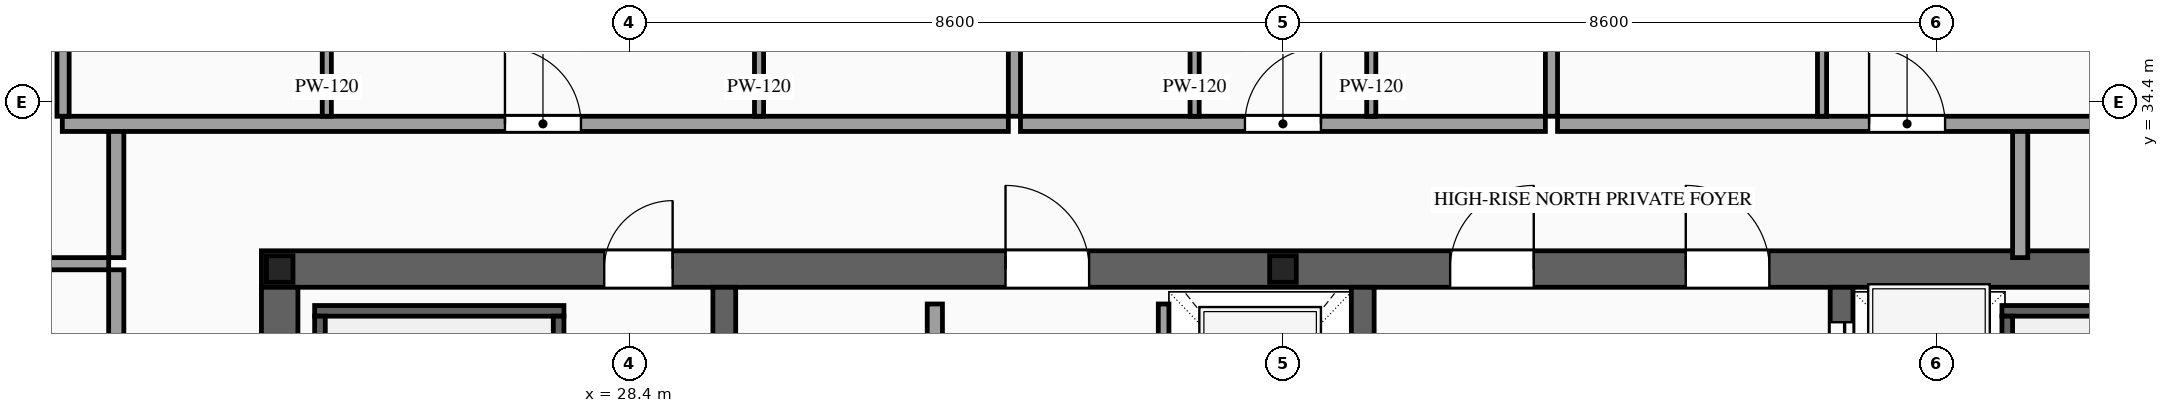
"""IFC4 building model, lengths in metres.
Left out: names, types, materials, properties, quantities, classifications, styles, units other than length and angle.
Written with IfcOpenShell. Run it as: python <this file> out.ifc"""

import sys

from ifc_helpers import new_model, si_unit, direction, frame, frame_2d, origin, origin_2d, place, context, subcontext, project, spatial, rectangle, i_section, extrude, source, transform, mapped, element, fill, save


model = new_model("IFC4")
c1 = context("Model", 3, precision=1e-05, world=origin(), true_north=direction((0.0, 1.0)))
c2 = subcontext(c1, "Body", "Model", "MODEL_VIEW")
j1 = project(units=[si_unit("LENGTHUNIT", "METRE"), si_unit("PLANEANGLEUNIT", "RADIAN")], contexts=[c1])
p1 = place(None, origin())
s1 = spatial("IfcSite", under=j1, at=p1, CompositionType="ELEMENT")
p2 = place(p1, origin())
s2 = spatial("IfcBuilding", under=s1, at=p2, CompositionType="ELEMENT")
p3 = place(p2, frame((0.0, 0.0, 339.2)))
s3 = spatial("IfcBuildingStorey", under=s2, at=p3, CompositionType="ELEMENT", Elevation=339.2)
p4 = place(p3, frame((23.56, 32.2, 0.0), z_axis=(0.0, 0.0, 1.0), x_axis=(1.0, 0.0, 0.0)))
e1 = element("IfcWall", 1, at=p4, inside=s3, PredefinedType="SHEAR", context=c2, shape_type="SweptSolid", body=[
    extrude(rectangle(XDim=26.88, YDim=0.48, at=frame_2d((13.44, 0.0))), origin(), (0.0, 0.0, 1.0), 4.0),
])
p5 = place(p4, frame((4.51, 0.0, 0.0)))
e2 = element("IfcOpeningElement", 2, at=p5, cuts=e1, PredefinedType="OPENING", context=c2, shape_type="SweptSolid", body=[
    extrude(rectangle(XDim=0.9, YDim=2.15, at=frame_2d((0.45, 1.075))), frame((0.0, 0.255, 0.0), z_axis=(0.0, -1.0, 0.0), x_axis=(1.0, 0.0, 0.0)), (0.0, 0.0, 1.0), 0.51),
])
p6 = place(p4, frame((9.79, 0.0, 0.0)))
e3 = element("IfcOpeningElement", 3, at=p6, cuts=e1, PredefinedType="OPENING", context=c2, shape_type="SweptSolid", body=[
    extrude(rectangle(XDim=1.1, YDim=2.2, at=frame_2d((0.55, 1.1))), frame((0.0, 0.255, 0.0), z_axis=(0.0, -1.0, 0.0), x_axis=(1.0, 0.0, 0.0)), (0.0, 0.0, 1.0), 0.51),
])
p7 = place(p4, frame((15.64, 0.0, 0.0)))
e4 = element("IfcOpeningElement", 4, at=p7, cuts=e1, PredefinedType="OPENING", context=c2, shape_type="SweptSolid", body=[
    extrude(rectangle(XDim=1.1, YDim=2.2, at=frame_2d((0.55, 1.1))), frame((0.0, 0.255, 0.0), z_axis=(0.0, -1.0, 0.0), x_axis=(1.0, 0.0, 0.0)), (0.0, 0.0, 1.0), 0.51),
])
p8 = place(p4, frame((18.74, 0.0, 0.0)))
e5 = element("IfcOpeningElement", 5, at=p8, cuts=e1, PredefinedType="OPENING", context=c2, shape_type="SweptSolid", body=[
    extrude(rectangle(XDim=1.1, YDim=2.2, at=frame_2d((0.55, 1.1))), frame((0.0, 0.255, 0.0), z_axis=(0.0, -1.0, 0.0), x_axis=(1.0, 0.0, 0.0)), (0.0, 0.0, 1.0), 0.51),
])
m1 = source(origin(), c2, "Body", "SweptSolid", [
    extrude(rectangle(XDim=12.32, YDim=0.48, at=frame_2d((6.16, 0.0))), origin(), (0.0, 0.0, 1.0), 4.0),
])
p9 = place(p3, frame((23.8, 19.64, 0.0), z_axis=(0.0, 0.0, 1.0), x_axis=(0.0, 1.0, 0.0)))
e6 = element("IfcWall", 6, at=p9, inside=s3, PredefinedType="SHEAR", context=c2, shape_type="MappedRepresentation", body=[
    mapped(m1, transform((0.0, 0.0, 0.0), scale=1.0)),
])
m2 = source(origin(), c2, "Body", "SweptSolid", [
    extrude(rectangle(XDim=12.32, YDim=0.3, at=frame_2d((6.16, 0.0))), origin(), (0.0, 0.0, 1.0), 4.0),
])
for number, where, z_axis, x_axis in (
    (7, (29.65, 19.64, 0.0), (0.0, 0.0, 1.0), (0.0, 1.0, 0.0)),
    (8, (38.05, 19.64, 0.0), (0.0, 0.0, 1.0), (0.0, 1.0, 0.0)),
):
    element("IfcWall", number, at=place(p3, frame(where, z_axis=z_axis, x_axis=x_axis)), inside=s3, PredefinedType="SOLIDWALL", context=c2, shape_type="MappedRepresentation", body=[
        mapped(m2, transform((0.0, 0.0, 0.0), scale=1.0)),
    ])
p10 = place(p3, frame((44.35, 19.64, 0.0), z_axis=(0.0, 0.0, 1.0), x_axis=(0.0, 1.0, 0.0)))
e9 = element("IfcWall", 9, at=p10, inside=s3, PredefinedType="SOLIDWALL", context=c2, shape_type="SweptSolid", body=[
    extrude(rectangle(XDim=12.32, YDim=0.3, at=frame_2d((6.16, 0.0))), origin(), (0.0, 0.0, 1.0), 4.0),
])
p11 = place(p10, frame((6.56, 0.0, 0.0)))
e10 = element("IfcOpeningElement", 10, at=p11, cuts=e9, PredefinedType="OPENING", context=c2, shape_type="SweptSolid", body=[
    extrude(rectangle(XDim=1.1, YDim=2.2, at=frame_2d((0.55, 1.1))), frame((0.0, 0.165, 0.0), z_axis=(0.0, -1.0, 0.0), x_axis=(1.0, 0.0, 0.0)), (0.0, 0.0, 1.0), 0.33),
])
p12 = place(p10, frame((8.66, 0.0, 0.0)))
e11 = element("IfcOpeningElement", 11, at=p12, cuts=e9, PredefinedType="OPENING", context=c2, shape_type="SweptSolid", body=[
    extrude(rectangle(XDim=1.1, YDim=2.2, at=frame_2d((0.55, 1.1))), frame((0.0, 0.165, 0.0), z_axis=(0.0, -1.0, 0.0), x_axis=(1.0, 0.0, 0.0)), (0.0, 0.0, 1.0), 0.33),
])
p13 = place(p10, frame((10.76, 0.0, 0.0)))
e12 = element("IfcOpeningElement", 12, at=p13, cuts=e9, PredefinedType="OPENING", context=c2, shape_type="SweptSolid", body=[
    extrude(rectangle(XDim=1.1, YDim=2.2, at=frame_2d((0.55, 1.1))), frame((0.0, 0.165, 0.0), z_axis=(0.0, -1.0, 0.0), x_axis=(1.0, 0.0, 0.0)), (0.0, 0.0, 1.0), 0.33),
])
m3 = source(origin(), c2, "Body", "SweptSolid", [
    extrude(i_section(OverallWidth=0.35, OverallDepth=0.35, WebThickness=0.012, FlangeThickness=0.019, at=origin_2d()), origin(), (0.0, 0.0, 1.0), 4.0),
])
for number, where, z_axis, x_axis in (
    (13, (23.8, 32.2, 0.0), (0.0, 0.0, 1.0), (1.0, 0.0, 0.0)),
    (14, (37.0, 32.2, 0.0), (0.0, 0.0, 1.0), (1.0, 0.0, 0.0)),
):
    element("IfcColumn", number, at=place(p3, frame(where, z_axis=z_axis, x_axis=x_axis)), inside=s3, PredefinedType="COLUMN", context=c2, shape_type="MappedRepresentation", body=[
        mapped(m3, transform((0.0, 0.0, 0.0), scale=1.0)),
    ])
p14 = place(p3, frame((35.43, 29.4, 0.0), z_axis=(0.0, 0.0, 1.0), x_axis=(0.0, 1.0, 0.0)))
e15 = element("IfcWall", 15, at=p14, inside=s3, PredefinedType="SOLIDWALL", context=c2, shape_type="SweptSolid", body=[
    extrude(rectangle(XDim=2.34, YDim=0.14, at=frame_2d((1.17, 0.0))), origin(), (0.0, 0.0, 1.0), 3.76),
])
p15 = place(p14, frame((0.62, 0.0, 0.0)))
e16 = element("IfcOpeningElement", 16, at=p15, cuts=e15, PredefinedType="OPENING", context=c2, shape_type="SweptSolid", body=[
    extrude(rectangle(XDim=1.1, YDim=2.2, at=frame_2d((0.55, 1.1))), frame((0.0, 0.085, 0.0), z_axis=(0.0, -1.0, 0.0), x_axis=(1.0, 0.0, 0.0)), (0.0, 0.0, 1.0), 0.17),
])
m4 = source(origin(), c2, "Body", "SweptSolid", [
    extrude(rectangle(XDim=3.28, YDim=0.14, at=frame_2d((1.64, 0.0))), origin(), (0.0, 0.0, 1.0), 3.76),
])
p16 = place(p3, frame((24.26, 31.65, 0.0), z_axis=(0.0, 0.0, 1.0), x_axis=(1.0, 0.0, 0.0)))
e17 = element("IfcWall", 17, at=p16, inside=s3, PredefinedType="SOLIDWALL", context=c2, shape_type="MappedRepresentation", body=[
    mapped(m4, transform((0.0, 0.0, 0.0), scale=1.0)),
])
m5 = source(origin(), c2, "Body", "SweptSolid", [
    extrude(rectangle(XDim=8.94, YDim=0.14, at=frame_2d((4.47, 0.0))), origin(), (0.0, 0.0, 1.0), 3.76),
])
for number, where, z_axis, x_axis in (
    (18, (24.33, 22.64, 0.0), (0.0, 0.0, 1.0), (0.0, 1.0, 0.0)),
    (19, (27.47, 22.64, 0.0), (0.0, 0.0, 1.0), (0.0, 1.0, 0.0)),
):
    element("IfcWall", number, at=place(p3, frame(where, z_axis=z_axis, x_axis=x_axis)), inside=s3, PredefinedType="SOLIDWALL", context=c2, shape_type="MappedRepresentation", body=[
        mapped(m5, transform((0.0, 0.0, 0.0), scale=1.0)),
    ])
p17 = place(p3, frame((46.46, 31.65, 0.0), z_axis=(0.0, 0.0, 1.0), x_axis=(1.0, 0.0, 0.0)))
e20 = element("IfcWall", 20, at=p17, inside=s3, PredefinedType="SOLIDWALL", context=c2, shape_type="MappedRepresentation", body=[
    mapped(m4, transform((0.0, 0.0, 0.0), scale=1.0)),
])
p18 = place(p3, frame((46.53, 22.64, 0.0), z_axis=(0.0, 0.0, 1.0), x_axis=(0.0, 1.0, 0.0)))
e21 = element("IfcWall", 21, at=p18, inside=s3, PredefinedType="SOLIDWALL", context=c2, shape_type="MappedRepresentation", body=[
    mapped(m5, transform((0.0, 0.0, 0.0), scale=1.0)),
])
p19 = place(p3, frame((32.42, 25.92, 0.0), z_axis=(0.0, 0.0, 1.0), x_axis=(0.0, 1.0, 0.0)))
e22 = element("IfcWall", 22, at=p19, inside=s3, PredefinedType="PARTITIONING", context=c2, shape_type="SweptSolid", body=[
    extrude(rectangle(XDim=5.82, YDim=0.2, at=frame_2d((2.91, 0.0))), origin(), (0.0, 0.0, 1.0), 3.76),
])
p20 = place(p19, frame((2.46, 0.0, 0.0)))
e23 = element("IfcOpeningElement", 23, at=p20, cuts=e22, PredefinedType="OPENING", context=c2, shape_type="SweptSolid", body=[
    extrude(rectangle(XDim=0.9, YDim=2.15, at=frame_2d((0.45, 1.075))), frame((0.0, 0.115, 0.0), z_axis=(0.0, -1.0, 0.0), x_axis=(1.0, 0.0, 0.0)), (0.0, 0.0, 1.0), 0.23),
])
m6 = source(origin(), c2, "Body", "SweptSolid", [
    extrude(rectangle(XDim=1.7, YDim=0.2, at=frame_2d((0.85, 0.0))), origin(), (0.0, 0.0, 1.0), 3.76),
])
for number, where, z_axis, x_axis in (
    (24, (21.65, 32.35, 0.0), (0.0, 0.0, 1.0), (0.0, 1.0, 0.0)),
    (25, (46.7, 32.35, 0.0), (0.0, 0.0, 1.0), (0.0, 1.0, 0.0)),
):
    element("IfcWall", number, at=place(p3, frame(where, z_axis=z_axis, x_axis=x_axis)), inside=s3, PredefinedType="PARTITIONING", context=c2, shape_type="MappedRepresentation", body=[
        mapped(m6, transform((0.0, 0.0, 0.0), scale=1.0)),
    ])
p21 = place(p3, frame((20.94, 34.11, 0.0), z_axis=(0.0, 0.0, 1.0), x_axis=(1.0, 0.0, 0.0)))
e26 = element("IfcWall", 26, at=p21, inside=s3, PredefinedType="PARTITIONING", context=c2, shape_type="SweptSolid", body=[
    extrude(rectangle(XDim=12.447, YDim=0.2, at=frame_2d((6.224, 0.0))), origin(), (0.0, 0.0, 1.0), 3.76),
])
p22 = place(p21, frame((5.824, 0.0, 0.0)))
e27 = element("IfcOpeningElement", 27, at=p22, cuts=e26, PredefinedType="OPENING", context=c2, shape_type="SweptSolid", body=[
    extrude(rectangle(XDim=1.0, YDim=2.2, at=frame_2d((0.5, 1.1))), frame((0.0, 0.115, 0.0), z_axis=(0.0, -1.0, 0.0), x_axis=(1.0, 0.0, 0.0)), (0.0, 0.0, 1.0), 0.23),
])
m7 = source(origin(), c2, "Body", "SweptSolid", [
    extrude(rectangle(XDim=10.54, YDim=0.16, at=frame_2d((5.27, 0.0))), origin(), (0.0, 0.0, 1.0), 3.76),
])
p23 = place(p3, frame((33.467, 34.21, 0.0), z_axis=(0.0, 0.0, 1.0), x_axis=(0.0, 1.0, 0.0)))
e28 = element("IfcWall", 28, at=p23, inside=s3, PredefinedType="PARTITIONING", context=c2, shape_type="MappedRepresentation", body=[
    mapped(m7, transform((0.0, 0.0, 0.0), scale=1.0)),
])
p24 = place(p3, frame((24.42, 34.21, 0.0), z_axis=(0.0, 0.0, 1.0), x_axis=(0.0, 1.0, 0.0)))
e29 = element("IfcWall", 29, at=p24, inside=s3, PredefinedType="PARTITIONING", context=c2, shape_type="SweptSolid", body=[
    extrude(rectangle(XDim=2.9, YDim=0.12, at=frame_2d((1.45, 0.0))), origin(), (0.0, 0.0, 1.0), 3.76),
])
p25 = place(p24, frame((1.025, 0.0, 0.0)))
e30 = element("IfcOpeningElement", 30, at=p25, cuts=e29, PredefinedType="OPENING", context=c2, shape_type="SweptSolid", body=[
    extrude(rectangle(XDim=0.85, YDim=2.1, at=frame_2d((0.425, 1.05))), frame((0.0, 0.075, 0.0), z_axis=(0.0, -1.0, 0.0), x_axis=(1.0, 0.0, 0.0)), (0.0, 0.0, 1.0), 0.15),
])
p26 = place(p3, frame((30.107, 34.21, 0.0), z_axis=(0.0, 0.0, 1.0), x_axis=(0.0, 1.0, 0.0)))
e31 = element("IfcWall", 31, at=p26, inside=s3, PredefinedType="PARTITIONING", context=c2, shape_type="SweptSolid", body=[
    extrude(rectangle(XDim=2.9, YDim=0.12, at=frame_2d((1.45, 0.0))), origin(), (0.0, 0.0, 1.0), 3.76),
])
p27 = place(p26, frame((1.025, 0.0, 0.0)))
e32 = element("IfcOpeningElement", 32, at=p27, cuts=e31, PredefinedType="OPENING", context=c2, shape_type="SweptSolid", body=[
    extrude(rectangle(XDim=0.85, YDim=2.1, at=frame_2d((0.425, 1.05))), frame((0.0, 0.075, 0.0), z_axis=(0.0, -1.0, 0.0), x_axis=(1.0, 0.0, 0.0)), (0.0, 0.0, 1.0), 0.15),
])
p28 = place(p3, frame((33.547, 34.11, 0.0), z_axis=(0.0, 0.0, 1.0), x_axis=(1.0, 0.0, 0.0)))
e33 = element("IfcWall", 33, at=p28, inside=s3, PredefinedType="PARTITIONING", context=c2, shape_type="SweptSolid", body=[
    extrude(rectangle(XDim=6.906, YDim=0.2, at=frame_2d((3.453, 0.0))), origin(), (0.0, 0.0, 1.0), 3.76),
])
p29 = place(p28, frame((2.953, 0.0, 0.0)))
e34 = element("IfcOpeningElement", 34, at=p29, cuts=e33, PredefinedType="OPENING", context=c2, shape_type="SweptSolid", body=[
    extrude(rectangle(XDim=1.0, YDim=2.2, at=frame_2d((0.5, 1.1))), frame((0.0, 0.115, 0.0), z_axis=(0.0, -1.0, 0.0), x_axis=(1.0, 0.0, 0.0)), (0.0, 0.0, 1.0), 0.23),
])
p30 = place(p3, frame((40.533, 34.21, 0.0), z_axis=(0.0, 0.0, 1.0), x_axis=(0.0, 1.0, 0.0)))
e35 = element("IfcWall", 35, at=p30, inside=s3, PredefinedType="PARTITIONING", context=c2, shape_type="MappedRepresentation", body=[
    mapped(m7, transform((0.0, 0.0, 0.0), scale=1.0)),
])
p31 = place(p3, frame((35.838, 34.21, 0.0), z_axis=(0.0, 0.0, 1.0), x_axis=(0.0, 1.0, 0.0)))
e36 = element("IfcWall", 36, at=p31, inside=s3, PredefinedType="PARTITIONING", context=c2, shape_type="SweptSolid", body=[
    extrude(rectangle(XDim=2.9, YDim=0.12, at=frame_2d((1.45, 0.0))), origin(), (0.0, 0.0, 1.0), 3.76),
])
p32 = place(p31, frame((1.025, 0.0, 0.0)))
e37 = element("IfcOpeningElement", 37, at=p32, cuts=e36, PredefinedType="OPENING", context=c2, shape_type="SweptSolid", body=[
    extrude(rectangle(XDim=0.85, YDim=2.1, at=frame_2d((0.425, 1.05))), frame((0.0, 0.075, 0.0), z_axis=(0.0, -1.0, 0.0), x_axis=(1.0, 0.0, 0.0)), (0.0, 0.0, 1.0), 0.15),
])
p33 = place(p3, frame((38.162, 34.21, 0.0), z_axis=(0.0, 0.0, 1.0), x_axis=(0.0, 1.0, 0.0)))
e38 = element("IfcWall", 38, at=p33, inside=s3, PredefinedType="PARTITIONING", context=c2, shape_type="SweptSolid", body=[
    extrude(rectangle(XDim=2.9, YDim=0.12, at=frame_2d((1.45, 0.0))), origin(), (0.0, 0.0, 1.0), 3.76),
])
p34 = place(p33, frame((1.025, 0.0, 0.0)))
e39 = element("IfcOpeningElement", 39, at=p34, cuts=e38, PredefinedType="OPENING", context=c2, shape_type="SweptSolid", body=[
    extrude(rectangle(XDim=0.85, YDim=2.1, at=frame_2d((0.425, 1.05))), frame((0.0, 0.075, 0.0), z_axis=(0.0, -1.0, 0.0), x_axis=(1.0, 0.0, 0.0)), (0.0, 0.0, 1.0), 0.15),
])
p35 = place(p3, frame((40.613, 34.11, 0.0), z_axis=(0.0, 0.0, 1.0), x_axis=(1.0, 0.0, 0.0)))
e40 = element("IfcWall", 40, at=p35, inside=s3, PredefinedType="PARTITIONING", context=c2, shape_type="SweptSolid", body=[
    extrude(rectangle(XDim=12.447, YDim=0.2, at=frame_2d((6.224, 0.0))), origin(), (0.0, 0.0, 1.0), 3.76),
])
p36 = place(p35, frame((4.099, 0.0, 0.0)))
e41 = element("IfcOpeningElement", 41, at=p36, cuts=e40, PredefinedType="OPENING", context=c2, shape_type="SweptSolid", body=[
    extrude(rectangle(XDim=1.0, YDim=2.2, at=frame_2d((0.5, 1.1))), frame((0.0, 0.115, 0.0), z_axis=(0.0, -1.0, 0.0), x_axis=(1.0, 0.0, 0.0)), (0.0, 0.0, 1.0), 0.23),
])
m8 = source(origin(), c2, "Body", "SweptSolid", [
    extrude(rectangle(XDim=10.39, YDim=0.16, at=frame_2d((5.195, 0.0))), origin(), (0.0, 0.0, 1.0), 3.76),
])
p37 = place(p3, frame((20.95, 34.21, 0.0), z_axis=(0.0, 0.0, 1.0), x_axis=(0.0, 1.0, 0.0)))
e42 = element("IfcWall", 42, at=p37, inside=s3, PredefinedType="PARTITIONING", context=c2, shape_type="MappedRepresentation", body=[
    mapped(m8, transform((0.0, 0.0, 0.0), scale=1.0)),
])
p38 = place(p3, frame((44.093, 34.21, 0.0), z_axis=(0.0, 0.0, 1.0), x_axis=(0.0, 1.0, 0.0)))
e43 = element("IfcWall", 43, at=p38, inside=s3, PredefinedType="PARTITIONING", context=c2, shape_type="SweptSolid", body=[
    extrude(rectangle(XDim=2.9, YDim=0.12, at=frame_2d((1.45, 0.0))), origin(), (0.0, 0.0, 1.0), 3.76),
])
p39 = place(p38, frame((1.025, 0.0, 0.0)))
e44 = element("IfcOpeningElement", 44, at=p39, cuts=e43, PredefinedType="OPENING", context=c2, shape_type="SweptSolid", body=[
    extrude(rectangle(XDim=0.85, YDim=2.1, at=frame_2d((0.425, 1.05))), frame((0.0, 0.075, 0.0), z_axis=(0.0, -1.0, 0.0), x_axis=(1.0, 0.0, 0.0)), (0.0, 0.0, 1.0), 0.15),
])
p40 = place(p3, frame((21.65, 19.41, 0.0), z_axis=(0.0, 0.0, 1.0), x_axis=(0.0, 1.0, 0.0)))
e45 = element("IfcWall", 45, at=p40, inside=s3, PredefinedType="PARTITIONING", context=c2, shape_type="SweptSolid", body=[
    extrude(rectangle(XDim=12.78, YDim=0.2, at=frame_2d((6.39, 0.0))), origin(), (0.0, 0.0, 1.0), 3.76),
])
p41 = place(p40, frame((5.89, 0.0, 0.0)))
e46 = element("IfcOpeningElement", 46, at=p41, cuts=e45, PredefinedType="OPENING", context=c2, shape_type="SweptSolid", body=[
    extrude(rectangle(XDim=1.0, YDim=2.2, at=frame_2d((0.5, 1.1))), frame((0.0, 0.115, 0.0), z_axis=(0.0, -1.0, 0.0), x_axis=(1.0, 0.0, 0.0)), (0.0, 0.0, 1.0), 0.23),
])
m9 = source(origin(), c2, "Body", "SweptSolid", [
    extrude(rectangle(XDim=3.5, YDim=0.16, at=frame_2d((1.75, 0.0))), origin(), (0.0, 0.0, 1.0), 3.305),
])
p42 = place(p3, frame((18.05, 32.27, 0.0), z_axis=(0.0, 0.0, 1.0), x_axis=(1.0, 0.0, 0.0)))
e47 = element("IfcWall", 47, at=p42, inside=s3, PredefinedType="PARTITIONING", context=c2, shape_type="MappedRepresentation", body=[
    mapped(m9, transform((0.0, 0.0, 0.0), scale=1.0)),
])
m10 = source(origin(), c2, "Body", "SweptSolid", [
    extrude(rectangle(XDim=1.1, YDim=2.2, at=frame_2d((0.55, 1.1))), frame((0.0, 0.025, 0.0), z_axis=(0.0, -1.0, 0.0), x_axis=(1.0, 0.0, 0.0)), (0.0, 0.0, 1.0), 0.05),
])
p43 = place(p13, origin())
e48 = element("IfcDoor", 48, at=p43, inside=s3, OperationType="SLIDING_TO_LEFT", PredefinedType="DOOR", context=c2, shape_type="MappedRepresentation", body=[
    mapped(m10, transform((0.0, 0.0, 0.0), scale=1.0)),
])
fill(e12, e48)
m11 = source(origin(), c2, "Body", "SweptSolid", [
    extrude(rectangle(XDim=0.9, YDim=2.15, at=frame_2d((0.45, 1.075))), frame((0.0, 0.025, 0.0), z_axis=(0.0, -1.0, 0.0), x_axis=(1.0, 0.0, 0.0)), (0.0, 0.0, 1.0), 0.05),
])
p44 = place(p5, origin())
e49 = element("IfcDoor", 49, at=p44, inside=s3, OperationType="SINGLE_SWING_RIGHT", PredefinedType="DOOR", context=c2, shape_type="MappedRepresentation", body=[
    mapped(m11, transform((0.0, 0.0, 0.0), scale=1.0)),
])
fill(e2, e49)
m12 = source(origin(), c2, "Body", "SweptSolid", [
    extrude(rectangle(XDim=1.1, YDim=2.2, at=frame_2d((0.55, 1.1))), frame((0.0, 0.025, 0.0), z_axis=(0.0, -1.0, 0.0), x_axis=(1.0, 0.0, 0.0)), (0.0, 0.0, 1.0), 0.05),
])
p45 = place(p6, origin())
e50 = element("IfcDoor", 50, at=p45, inside=s3, OperationType="SINGLE_SWING_LEFT", PredefinedType="DOOR", context=c2, shape_type="MappedRepresentation", body=[
    mapped(m12, transform((0.0, 0.0, 0.0), scale=1.0)),
])
fill(e3, e50)
p46 = place(p7, origin())
e51 = element("IfcDoor", 51, at=p46, inside=s3, OperationType="SINGLE_SWING_RIGHT", PredefinedType="DOOR", context=c2, shape_type="MappedRepresentation", body=[
    mapped(m12, transform((0.0, 0.0, 0.0), scale=1.0)),
])
fill(e4, e51)
p47 = place(p8, origin())
e52 = element("IfcDoor", 52, at=p47, inside=s3, OperationType="SINGLE_SWING_LEFT", PredefinedType="DOOR", context=c2, shape_type="MappedRepresentation", body=[
    mapped(m12, transform((0.0, 0.0, 0.0), scale=1.0)),
])
fill(e5, e52)
m13 = source(origin(), c2, "Body", "SweptSolid", [
    extrude(rectangle(XDim=1.0, YDim=2.2, at=frame_2d((0.5, 1.1))), frame((0.0, 0.025, 0.0), z_axis=(0.0, -1.0, 0.0), x_axis=(1.0, 0.0, 0.0)), (0.0, 0.0, 1.0), 0.05),
])
p48 = place(p22, origin())
e53 = element("IfcDoor", 53, at=p48, inside=s3, OperationType="SINGLE_SWING_LEFT", PredefinedType="DOOR", context=c2, shape_type="MappedRepresentation", body=[
    mapped(m13, transform((0.0, 0.0, 0.0), scale=1.0)),
])
fill(e27, e53)
p49 = place(p29, origin())
e54 = element("IfcDoor", 54, at=p49, inside=s3, OperationType="SINGLE_SWING_RIGHT", PredefinedType="DOOR", context=c2, shape_type="MappedRepresentation", body=[
    mapped(m13, transform((0.0, 0.0, 0.0), scale=1.0)),
])
fill(e34, e54)
p50 = place(p36, origin())
e55 = element("IfcDoor", 55, at=p50, inside=s3, OperationType="SINGLE_SWING_LEFT", PredefinedType="DOOR", context=c2, shape_type="MappedRepresentation", body=[
    mapped(m13, transform((0.0, 0.0, 0.0), scale=1.0)),
])
fill(e41, e55)
save(model, sys.argv[1])
